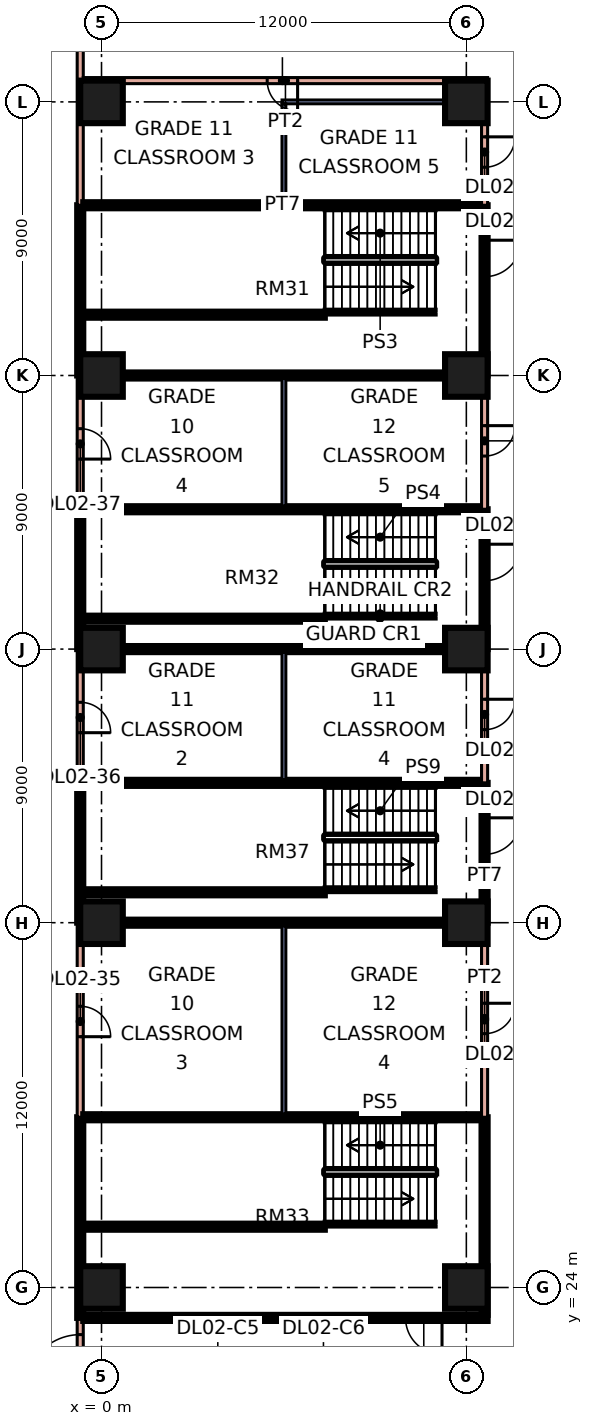
"""IFC4 building model, lengths in metres.
Left out: names, types, materials, properties, quantities, classifications, styles, units other than length and angle.
Written with IfcOpenShell. Run it as: python <this file> out.ifc"""

import sys

from ifc_helpers import new_model, si_unit, direction, frame, frame_2d, origin, origin_2d, place, context, subcontext, project, spatial, rectangle, extrude, element, fill, save


model = new_model("IFC4")
c1 = context("Model", 3, precision=1e-05, world=origin(), true_north=direction((0.0, 1.0)))
c2 = subcontext(c1, "Body", "Model", "MODEL_VIEW")
j1 = project(units=[si_unit("LENGTHUNIT", "METRE"), si_unit("PLANEANGLEUNIT", "RADIAN")], contexts=[c1])
p1 = place(None, origin())
s1 = spatial("IfcSite", under=j1, at=p1, CompositionType="ELEMENT")
p2 = place(p1, origin())
s2 = spatial("IfcBuilding", under=s1, at=p2, CompositionType="ELEMENT")
p3 = place(p2, frame((0.0, 0.0, 12.0)))
s3 = spatial("IfcBuildingStorey", under=s2, at=p3, CompositionType="ELEMENT", Elevation=12.0)
for number, where, z_axis, x_axis in (
    (1, (0.0, 24.0, 0.0), (0.0, 0.0, 1.0), (1.0, 0.0, 0.0)),
    (2, (12.0, 24.0, 0.0), (0.0, 0.0, 1.0), (1.0, 0.0, 0.0)),
    (3, (0.0, 36.0, 0.0), (0.0, 0.0, 1.0), (1.0, 0.0, 0.0)),
    (4, (12.0, 36.0, 0.0), (0.0, 0.0, 1.0), (1.0, 0.0, 0.0)),
    (5, (0.0, 45.0, 0.0), (0.0, 0.0, 1.0), (1.0, 0.0, 0.0)),
    (6, (12.0, 45.0, 0.0), (0.0, 0.0, 1.0), (1.0, 0.0, 0.0)),
    (7, (0.0, 54.0, 0.0), (0.0, 0.0, 1.0), (1.0, 0.0, 0.0)),
    (8, (12.0, 54.0, 0.0), (0.0, 0.0, 1.0), (1.0, 0.0, 0.0)),
    (9, (0.0, 63.0, 0.0), (0.0, 0.0, 1.0), (1.0, 0.0, 0.0)),
    (10, (12.0, 63.0, 0.0), (0.0, 0.0, 1.0), (1.0, 0.0, 0.0)),
):
    element("IfcColumn", number, at=place(p3, frame(where, z_axis=z_axis, x_axis=x_axis)), inside=s3, PredefinedType="COLUMN", context=c2, shape_type="SweptSolid", body=[
        extrude(rectangle(XDim=1.4, YDim=1.4, at=origin_2d()), origin(), (0.0, 0.0, 1.0), 4.8),
    ])
p4 = place(p3, frame((-0.7, 0.7, 0.0), z_axis=(0.0, 0.0, 1.0), x_axis=(0.0, 1.0, 0.0)))
e11 = element("IfcWall", 11, at=p4, inside=s3, PredefinedType="PARTITIONING", context=c2, shape_type="SweptSolid", body=[
    extrude(rectangle(XDim=22.3, YDim=0.2, at=frame_2d((11.15, 0.0))), origin(), (0.0, 0.0, 1.0), 4.4),
])
p5 = place(p4, frame((19.95, 0.0, 0.0)))
e12 = element("IfcOpeningElement", 12, at=p5, cuts=e11, PredefinedType="OPENING", context=c2, shape_type="SweptSolid", body=[
    extrude(rectangle(XDim=1.8, YDim=2.1, at=frame_2d((0.9, 1.05))), frame((0.0, 0.11, 0.0), z_axis=(0.0, -1.0, 0.0), x_axis=(1.0, 0.0, 0.0)), (0.0, 0.0, 1.0), 0.22),
])
p6 = place(p4, frame((12.2, 0.0, 0.0)))
e13 = element("IfcOpeningElement", 13, at=p6, cuts=e11, PredefinedType="OPENING", context=c2, shape_type="SweptSolid", body=[
    extrude(rectangle(XDim=1.0, YDim=2.1, at=frame_2d((0.5, 1.05))), frame((0.0, 0.11, 0.0), z_axis=(0.0, -1.0, 0.0), x_axis=(1.0, 0.0, 0.0)), (0.0, 0.0, 1.0), 0.22),
])
p7 = place(p4, frame((3.0, 0.0, 0.0)))
e14 = element("IfcOpeningElement", 14, at=p7, cuts=e11, PredefinedType="OPENING", context=c2, shape_type="SweptSolid", body=[
    extrude(rectangle(XDim=1.0, YDim=2.1, at=frame_2d((0.5, 1.05))), frame((0.0, 0.11, 0.0), z_axis=(0.0, -1.0, 0.0), x_axis=(1.0, 0.0, 0.0)), (0.0, 0.0, 1.0), 0.22),
])
p8 = place(p3, frame((-0.7, 23.0, 0.0), z_axis=(0.0, 0.0, 1.0), x_axis=(0.0, 1.0, 0.0)))
e15 = element("IfcWall", 15, at=p8, inside=s3, PredefinedType="SOLIDWALL", context=c2, shape_type="SweptSolid", body=[
    extrude(rectangle(XDim=6.6, YDim=0.2, at=frame_2d((3.3, 0.0))), origin(), (0.0, 0.0, 1.0), 4.4),
])
p9 = place(p3, frame((-0.7, 29.6, 0.0), z_axis=(0.0, 0.0, 1.0), x_axis=(0.0, 1.0, 0.0)))
e16 = element("IfcWall", 16, at=p9, inside=s3, PredefinedType="PARTITIONING", context=c2, shape_type="SweptSolid", body=[
    extrude(rectangle(XDim=6.4, YDim=0.2, at=frame_2d((3.2, 0.0))), origin(), (0.0, 0.0, 1.0), 4.4),
])
p10 = place(p9, frame((2.65, 0.0, 0.0)))
e17 = element("IfcOpeningElement", 17, at=p10, cuts=e16, PredefinedType="OPENING", context=c2, shape_type="SweptSolid", body=[
    extrude(rectangle(XDim=1.0, YDim=2.1, at=frame_2d((0.5, 1.05))), frame((0.0, 0.11, 0.0), z_axis=(0.0, -1.0, 0.0), x_axis=(1.0, 0.0, 0.0)), (0.0, 0.0, 1.0), 0.22),
])
p11 = place(p3, frame((-0.7, 36.0, 0.0), z_axis=(0.0, 0.0, 1.0), x_axis=(0.0, 1.0, 0.0)))
e18 = element("IfcWall", 18, at=p11, inside=s3, PredefinedType="SOLIDWALL", context=c2, shape_type="SweptSolid", body=[
    extrude(rectangle(XDim=4.6, YDim=0.2, at=frame_2d((2.3, 0.0))), origin(), (0.0, 0.0, 1.0), 4.4),
])
p12 = place(p3, frame((-0.7, 40.6, 0.0), z_axis=(0.0, 0.0, 1.0), x_axis=(0.0, 1.0, 0.0)))
e19 = element("IfcWall", 19, at=p12, inside=s3, PredefinedType="PARTITIONING", context=c2, shape_type="SweptSolid", body=[
    extrude(rectangle(XDim=4.4, YDim=0.2, at=frame_2d((2.2, 0.0))), origin(), (0.0, 0.0, 1.0), 4.4),
])
p13 = place(p12, frame((1.65, 0.0, 0.0)))
e20 = element("IfcOpeningElement", 20, at=p13, cuts=e19, PredefinedType="OPENING", context=c2, shape_type="SweptSolid", body=[
    extrude(rectangle(XDim=1.0, YDim=2.1, at=frame_2d((0.5, 1.05))), frame((0.0, 0.11, 0.0), z_axis=(0.0, -1.0, 0.0), x_axis=(1.0, 0.0, 0.0)), (0.0, 0.0, 1.0), 0.22),
])
p14 = place(p3, frame((-0.7, 45.0, 0.0), z_axis=(0.0, 0.0, 1.0), x_axis=(0.0, 1.0, 0.0)))
e21 = element("IfcWall", 21, at=p14, inside=s3, PredefinedType="SOLIDWALL", context=c2, shape_type="SweptSolid", body=[
    extrude(rectangle(XDim=4.6, YDim=0.2, at=frame_2d((2.3, 0.0))), origin(), (0.0, 0.0, 1.0), 4.4),
])
p15 = place(p3, frame((-0.7, 49.6, 0.0), z_axis=(0.0, 0.0, 1.0), x_axis=(0.0, 1.0, 0.0)))
e22 = element("IfcWall", 22, at=p15, inside=s3, PredefinedType="PARTITIONING", context=c2, shape_type="SweptSolid", body=[
    extrude(rectangle(XDim=4.4, YDim=0.2, at=frame_2d((2.2, 0.0))), origin(), (0.0, 0.0, 1.0), 4.4),
])
p16 = place(p15, frame((1.65, 0.0, 0.0)))
e23 = element("IfcOpeningElement", 23, at=p16, cuts=e22, PredefinedType="OPENING", context=c2, shape_type="SweptSolid", body=[
    extrude(rectangle(XDim=1.0, YDim=2.1, at=frame_2d((0.5, 1.05))), frame((0.0, 0.11, 0.0), z_axis=(0.0, -1.0, 0.0), x_axis=(1.0, 0.0, 0.0)), (0.0, 0.0, 1.0), 0.22),
])
p17 = place(p3, frame((-0.7, 54.0, 0.0), z_axis=(0.0, 0.0, 1.0), x_axis=(0.0, 1.0, 0.0)))
e24 = element("IfcWall", 24, at=p17, inside=s3, PredefinedType="SOLIDWALL", context=c2, shape_type="SweptSolid", body=[
    extrude(rectangle(XDim=5.6, YDim=0.2, at=frame_2d((2.8, 0.0))), origin(), (0.0, 0.0, 1.0), 4.4),
])
p18 = place(p3, frame((-0.7, 59.6, 0.0), z_axis=(0.0, 0.0, 1.0), x_axis=(0.0, 1.0, 0.0)))
e25 = element("IfcWall", 25, at=p18, inside=s3, PredefinedType="PARTITIONING", context=c2, shape_type="SweptSolid", body=[
    extrude(rectangle(XDim=6.4, YDim=0.2, at=frame_2d((3.2, 0.0))), origin(), (0.0, 0.0, 1.0), 4.4),
])
p19 = place(p3, frame((-0.6, 23.0, 0.0), z_axis=(0.0, 0.0, 1.0), x_axis=(1.0, 0.0, 0.0)))
e26 = element("IfcWall", 26, at=p19, inside=s3, PredefinedType="SOLIDWALL", context=c2, shape_type="SweptSolid", body=[
    extrude(rectangle(XDim=13.3, YDim=0.2, at=frame_2d((6.65, 0.0))), origin(), (0.0, 0.0, 1.0), 4.4),
])
p20 = place(p19, frame((10.6, 0.0, 0.0)))
e27 = element("IfcOpeningElement", 27, at=p20, cuts=e26, PredefinedType="OPENING", context=c2, shape_type="SweptSolid", body=[
    extrude(rectangle(XDim=1.2, YDim=2.1, at=frame_2d((0.6, 1.05))), frame((0.0, 0.11, 0.0), z_axis=(0.0, -1.0, 0.0), x_axis=(1.0, 0.0, 0.0)), (0.0, 0.0, 1.0), 0.22),
])
for number, where, z_axis, x_axis in (
    (28, (-0.6, 29.6, 0.0), (0.0, 0.0, 1.0), (1.0, 0.0, 0.0)),
    (29, (-0.6, 36.0, 0.0), (0.0, 0.0, 1.0), (1.0, 0.0, 0.0)),
    (30, (-0.6, 40.6, 0.0), (0.0, 0.0, 1.0), (1.0, 0.0, 0.0)),
    (31, (-0.6, 45.0, 0.0), (0.0, 0.0, 1.0), (1.0, 0.0, 0.0)),
    (32, (-0.6, 49.6, 0.0), (0.0, 0.0, 1.0), (1.0, 0.0, 0.0)),
    (33, (-0.6, 54.0, 0.0), (0.0, 0.0, 1.0), (1.0, 0.0, 0.0)),
    (34, (-0.6, 59.6, 0.0), (0.0, 0.0, 1.0), (1.0, 0.0, 0.0)),
):
    element("IfcWall", number, at=place(p3, frame(where, z_axis=z_axis, x_axis=x_axis)), inside=s3, PredefinedType="SOLIDWALL", context=c2, shape_type="SweptSolid", body=[
        extrude(rectangle(XDim=13.1, YDim=0.2, at=frame_2d((6.55, 0.0))), origin(), (0.0, 0.0, 1.0), 4.4),
    ])
p21 = place(p3, frame((-0.6, 63.7, 0.0), z_axis=(0.0, 0.0, 1.0), x_axis=(1.0, 0.0, 0.0)))
e35 = element("IfcWall", 35, at=p21, inside=s3, PredefinedType="PARTITIONING", context=c2, shape_type="SweptSolid", body=[
    extrude(rectangle(XDim=13.3, YDim=0.2, at=frame_2d((6.65, 0.0))), origin(), (0.0, 0.0, 1.0), 4.4),
])
p22 = place(p21, frame((6.05, 0.0, 0.0)))
e36 = element("IfcOpeningElement", 36, at=p22, cuts=e35, PredefinedType="OPENING", context=c2, shape_type="SweptSolid", body=[
    extrude(rectangle(XDim=1.0, YDim=2.1, at=frame_2d((0.5, 1.05))), frame((0.0, 0.11, 0.0), z_axis=(0.0, -1.0, 0.0), x_axis=(1.0, 0.0, 0.0)), (0.0, 0.0, 1.0), 0.22),
])
p23 = place(p3, frame((5.938, 63.0, 0.0), z_axis=(0.0, 0.0, 1.0), x_axis=(1.0, 0.0, 0.0)))
e37 = element("IfcWall", 37, at=p23, inside=s3, PredefinedType="PARTITIONING", context=c2, shape_type="SweptSolid", body=[
    extrude(rectangle(XDim=6.562, YDim=0.125, at=frame_2d((3.281, 0.0))), origin(), (0.0, 0.0, 1.0), 4.4),
])
p24 = place(p3, frame((6.0, 29.7, 0.0), z_axis=(0.0, 0.0, 1.0), x_axis=(0.0, 1.0, 0.0)))
e38 = element("IfcWall", 38, at=p24, inside=s3, PredefinedType="PARTITIONING", context=c2, shape_type="SweptSolid", body=[
    extrude(rectangle(XDim=6.2, YDim=0.125, at=frame_2d((3.1, 0.0))), origin(), (0.0, 0.0, 1.0), 4.4),
])
for number, where, z_axis, x_axis in (
    (39, (6.0, 40.7, 0.0), (0.0, 0.0, 1.0), (0.0, 1.0, 0.0)),
    (40, (6.0, 49.7, 0.0), (0.0, 0.0, 1.0), (0.0, 1.0, 0.0)),
):
    element("IfcWall", number, at=place(p3, frame(where, z_axis=z_axis, x_axis=x_axis)), inside=s3, PredefinedType="PARTITIONING", context=c2, shape_type="SweptSolid", body=[
        extrude(rectangle(XDim=4.2, YDim=0.125, at=frame_2d((2.1, 0.0))), origin(), (0.0, 0.0, 1.0), 4.4),
    ])
p25 = place(p3, frame((6.0, 59.7, 0.0), z_axis=(0.0, 0.0, 1.0), x_axis=(0.0, 1.0, 0.0)))
e41 = element("IfcWall", 41, at=p25, inside=s3, PredefinedType="PARTITIONING", context=c2, shape_type="SweptSolid", body=[
    extrude(rectangle(XDim=3.238, YDim=0.125, at=frame_2d((1.619, 0.0))), origin(), (0.0, 0.0, 1.0), 4.4),
])
p26 = place(p3, frame((12.6, 23.1, 0.0), z_axis=(0.0, 0.0, 1.0), x_axis=(0.0, 1.0, 0.0)))
e42 = element("IfcWall", 42, at=p26, inside=s3, PredefinedType="SOLIDWALL", context=c2, shape_type="SweptSolid", body=[
    extrude(rectangle(XDim=6.5, YDim=0.2, at=frame_2d((3.25, 0.0))), origin(), (0.0, 0.0, 1.0), 4.4),
])
p27 = place(p3, frame((12.6, 29.6, 0.0), z_axis=(0.0, 0.0, 1.0), x_axis=(0.0, 1.0, 0.0)))
e43 = element("IfcWall", 43, at=p27, inside=s3, PredefinedType="PARTITIONING", context=c2, shape_type="SweptSolid", body=[
    extrude(rectangle(XDim=6.4, YDim=0.2, at=frame_2d((3.2, 0.0))), origin(), (0.0, 0.0, 1.0), 4.4),
])
p28 = place(p27, frame((2.75, 0.0, 0.0)))
e44 = element("IfcOpeningElement", 44, at=p28, cuts=e43, PredefinedType="OPENING", context=c2, shape_type="SweptSolid", body=[
    extrude(rectangle(XDim=1.0, YDim=2.1, at=frame_2d((0.5, 1.05))), frame((0.0, 0.11, 0.0), z_axis=(0.0, -1.0, 0.0), x_axis=(1.0, 0.0, 0.0)), (0.0, 0.0, 1.0), 0.22),
])
p29 = place(p3, frame((12.6, 36.0, 0.0), z_axis=(0.0, 0.0, 1.0), x_axis=(0.0, 1.0, 0.0)))
e45 = element("IfcWall", 45, at=p29, inside=s3, PredefinedType="SOLIDWALL", context=c2, shape_type="SweptSolid", body=[
    extrude(rectangle(XDim=4.6, YDim=0.2, at=frame_2d((2.3, 0.0))), origin(), (0.0, 0.0, 1.0), 4.4),
])
p30 = place(p29, frame((2.25, 0.0, 0.0)))
e46 = element("IfcOpeningElement", 46, at=p30, cuts=e45, PredefinedType="OPENING", context=c2, shape_type="SweptSolid", body=[
    extrude(rectangle(XDim=1.2, YDim=2.1, at=frame_2d((0.6, 1.05))), frame((0.0, 0.11, 0.0), z_axis=(0.0, -1.0, 0.0), x_axis=(1.0, 0.0, 0.0)), (0.0, 0.0, 1.0), 0.22),
])
p31 = place(p3, frame((12.6, 40.6, 0.0), z_axis=(0.0, 0.0, 1.0), x_axis=(0.0, 1.0, 0.0)))
e47 = element("IfcWall", 47, at=p31, inside=s3, PredefinedType="PARTITIONING", context=c2, shape_type="SweptSolid", body=[
    extrude(rectangle(XDim=4.4, YDim=0.2, at=frame_2d((2.2, 0.0))), origin(), (0.0, 0.0, 1.0), 4.4),
])
p32 = place(p31, frame((1.75, 0.0, 0.0)))
e48 = element("IfcOpeningElement", 48, at=p32, cuts=e47, PredefinedType="OPENING", context=c2, shape_type="SweptSolid", body=[
    extrude(rectangle(XDim=1.0, YDim=2.1, at=frame_2d((0.5, 1.05))), frame((0.0, 0.11, 0.0), z_axis=(0.0, -1.0, 0.0), x_axis=(1.0, 0.0, 0.0)), (0.0, 0.0, 1.0), 0.22),
])
p33 = place(p3, frame((12.6, 45.0, 0.0), z_axis=(0.0, 0.0, 1.0), x_axis=(0.0, 1.0, 0.0)))
e49 = element("IfcWall", 49, at=p33, inside=s3, PredefinedType="SOLIDWALL", context=c2, shape_type="SweptSolid", body=[
    extrude(rectangle(XDim=4.6, YDim=0.2, at=frame_2d((2.3, 0.0))), origin(), (0.0, 0.0, 1.0), 4.4),
])
p34 = place(p33, frame((2.25, 0.0, 0.0)))
e50 = element("IfcOpeningElement", 50, at=p34, cuts=e49, PredefinedType="OPENING", context=c2, shape_type="SweptSolid", body=[
    extrude(rectangle(XDim=1.2, YDim=2.1, at=frame_2d((0.6, 1.05))), frame((0.0, 0.11, 0.0), z_axis=(0.0, -1.0, 0.0), x_axis=(1.0, 0.0, 0.0)), (0.0, 0.0, 1.0), 0.22),
])
p35 = place(p3, frame((12.6, 49.6, 0.0), z_axis=(0.0, 0.0, 1.0), x_axis=(0.0, 1.0, 0.0)))
e51 = element("IfcWall", 51, at=p35, inside=s3, PredefinedType="PARTITIONING", context=c2, shape_type="SweptSolid", body=[
    extrude(rectangle(XDim=4.4, YDim=0.2, at=frame_2d((2.2, 0.0))), origin(), (0.0, 0.0, 1.0), 4.4),
])
p36 = place(p35, frame((1.75, 0.0, 0.0)))
e52 = element("IfcOpeningElement", 52, at=p36, cuts=e51, PredefinedType="OPENING", context=c2, shape_type="SweptSolid", body=[
    extrude(rectangle(XDim=1.0, YDim=2.1, at=frame_2d((0.5, 1.05))), frame((0.0, 0.11, 0.0), z_axis=(0.0, -1.0, 0.0), x_axis=(1.0, 0.0, 0.0)), (0.0, 0.0, 1.0), 0.22),
])
p37 = place(p3, frame((12.6, 54.0, 0.0), z_axis=(0.0, 0.0, 1.0), x_axis=(0.0, 1.0, 0.0)))
e53 = element("IfcWall", 53, at=p37, inside=s3, PredefinedType="SOLIDWALL", context=c2, shape_type="SweptSolid", body=[
    extrude(rectangle(XDim=5.6, YDim=0.2, at=frame_2d((2.8, 0.0))), origin(), (0.0, 0.0, 1.0), 4.4),
])
p38 = place(p37, frame((3.25, 0.0, 0.0)))
e54 = element("IfcOpeningElement", 54, at=p38, cuts=e53, PredefinedType="OPENING", context=c2, shape_type="SweptSolid", body=[
    extrude(rectangle(XDim=1.2, YDim=2.1, at=frame_2d((0.6, 1.05))), frame((0.0, 0.11, 0.0), z_axis=(0.0, -1.0, 0.0), x_axis=(1.0, 0.0, 0.0)), (0.0, 0.0, 1.0), 0.22),
])
p39 = place(p3, frame((12.6, 59.6, 0.0), z_axis=(0.0, 0.0, 1.0), x_axis=(0.0, 1.0, 0.0)))
e55 = element("IfcWall", 55, at=p39, inside=s3, PredefinedType="PARTITIONING", context=c2, shape_type="SweptSolid", body=[
    extrude(rectangle(XDim=4.0, YDim=0.2, at=frame_2d((2.0, 0.0))), origin(), (0.0, 0.0, 1.0), 4.4),
])
p40 = place(p39, frame((1.25, 0.0, 0.0)))
e56 = element("IfcOpeningElement", 56, at=p40, cuts=e55, PredefinedType="OPENING", context=c2, shape_type="SweptSolid", body=[
    extrude(rectangle(XDim=1.0, YDim=2.1, at=frame_2d((0.5, 1.05))), frame((0.0, 0.11, 0.0), z_axis=(0.0, -1.0, 0.0), x_axis=(1.0, 0.0, 0.0)), (0.0, 0.0, 1.0), 0.22),
])
for number, where, z_axis, x_axis in (
    (57, (-0.6, 56.0, 0.0), (0.0, 0.0, 1.0), (1.0, 0.0, 0.0)),
    (58, (-0.6, 46.0, 0.0), (0.0, 0.0, 1.0), (1.0, 0.0, 0.0)),
    (59, (-0.6, 26.0, 0.0), (0.0, 0.0, 1.0), (1.0, 0.0, 0.0)),
    (60, (-0.6, 37.0, 0.0), (0.0, 0.0, 1.0), (1.0, 0.0, 0.0)),
):
    element("IfcWall", number, at=place(p3, frame(where, z_axis=z_axis, x_axis=x_axis)), inside=s3, PredefinedType="SOLIDWALL", context=c2, shape_type="SweptSolid", body=[
        extrude(rectangle(XDim=7.945, YDim=0.2, at=frame_2d((3.973, 0.0))), origin(), (0.0, 0.0, 1.0), 4.4),
    ])
p41 = place(p28, origin())
e61 = element("IfcDoor", 61, at=p41, inside=s3, OperationType="SINGLE_SWING_RIGHT", PredefinedType="DOOR", context=c2, shape_type="SweptSolid", body=[
    extrude(rectangle(XDim=1.0, YDim=2.1, at=frame_2d((0.5, 1.05))), frame((0.0, 0.025, 0.0), z_axis=(0.0, -1.0, 0.0), x_axis=(1.0, 0.0, 0.0)), (0.0, 0.0, 1.0), 0.05),
])
fill(e44, e61)
p42 = place(p32, origin())
e62 = element("IfcDoor", 62, at=p42, inside=s3, OperationType="SINGLE_SWING_RIGHT", PredefinedType="DOOR", context=c2, shape_type="SweptSolid", body=[
    extrude(rectangle(XDim=1.0, YDim=2.1, at=frame_2d((0.5, 1.05))), frame((0.0, 0.025, 0.0), z_axis=(0.0, -1.0, 0.0), x_axis=(1.0, 0.0, 0.0)), (0.0, 0.0, 1.0), 0.05),
])
fill(e48, e62)
p43 = place(p36, origin())
e63 = element("IfcDoor", 63, at=p43, inside=s3, OperationType="SINGLE_SWING_RIGHT", PredefinedType="DOOR", context=c2, shape_type="SweptSolid", body=[
    extrude(rectangle(XDim=1.0, YDim=2.1, at=frame_2d((0.5, 1.05))), frame((0.0, 0.025, 0.0), z_axis=(0.0, -1.0, 0.0), x_axis=(1.0, 0.0, 0.0)), (0.0, 0.0, 1.0), 0.05),
])
fill(e52, e63)
p44 = place(p40, origin())
e64 = element("IfcDoor", 64, at=p44, inside=s3, OperationType="SINGLE_SWING_RIGHT", PredefinedType="DOOR", context=c2, shape_type="SweptSolid", body=[
    extrude(rectangle(XDim=1.0, YDim=2.1, at=frame_2d((0.5, 1.05))), frame((0.0, 0.025, 0.0), z_axis=(0.0, -1.0, 0.0), x_axis=(1.0, 0.0, 0.0)), (0.0, 0.0, 1.0), 0.05),
])
fill(e56, e64)
p45 = place(p10, frame((1.0, 0.0, 0.0), z_axis=(0.0, 0.0, 1.0), x_axis=(-1.0, 0.0, 0.0)))
e65 = element("IfcDoor", 65, at=p45, inside=s3, OperationType="SINGLE_SWING_LEFT", PredefinedType="DOOR", context=c2, shape_type="SweptSolid", body=[
    extrude(rectangle(XDim=1.0, YDim=2.1, at=frame_2d((0.5, 1.05))), frame((0.0, 0.025, 0.0), z_axis=(0.0, -1.0, 0.0), x_axis=(1.0, 0.0, 0.0)), (0.0, 0.0, 1.0), 0.05),
])
fill(e17, e65)
p46 = place(p13, frame((1.0, 0.0, 0.0), z_axis=(0.0, 0.0, 1.0), x_axis=(-1.0, 0.0, 0.0)))
e66 = element("IfcDoor", 66, at=p46, inside=s3, OperationType="SINGLE_SWING_LEFT", PredefinedType="DOOR", context=c2, shape_type="SweptSolid", body=[
    extrude(rectangle(XDim=1.0, YDim=2.1, at=frame_2d((0.5, 1.05))), frame((0.0, 0.025, 0.0), z_axis=(0.0, -1.0, 0.0), x_axis=(1.0, 0.0, 0.0)), (0.0, 0.0, 1.0), 0.05),
])
fill(e20, e66)
p47 = place(p16, frame((1.0, 0.0, 0.0), z_axis=(0.0, 0.0, 1.0), x_axis=(-1.0, 0.0, 0.0)))
e67 = element("IfcDoor", 67, at=p47, inside=s3, OperationType="SINGLE_SWING_LEFT", PredefinedType="DOOR", context=c2, shape_type="SweptSolid", body=[
    extrude(rectangle(XDim=1.0, YDim=2.1, at=frame_2d((0.5, 1.05))), frame((0.0, 0.025, 0.0), z_axis=(0.0, -1.0, 0.0), x_axis=(1.0, 0.0, 0.0)), (0.0, 0.0, 1.0), 0.05),
])
fill(e23, e67)
p48 = place(p22, origin())
e68 = element("IfcDoor", 68, at=p48, inside=s3, OperationType="SINGLE_SWING_RIGHT", PredefinedType="DOOR", context=c2, shape_type="SweptSolid", body=[
    extrude(rectangle(XDim=1.0, YDim=2.1, at=frame_2d((0.5, 1.05))), frame((0.0, 0.025, 0.0), z_axis=(0.0, -1.0, 0.0), x_axis=(1.0, 0.0, 0.0)), (0.0, 0.0, 1.0), 0.05),
])
fill(e36, e68)
p49 = place(p5, origin())
e69 = element("IfcDoor", 69, at=p49, inside=s3, OperationType="DOUBLE_DOOR_SINGLE_SWING", PredefinedType="DOOR", context=c2, shape_type="SweptSolid", body=[
    extrude(rectangle(XDim=1.8, YDim=2.1, at=frame_2d((0.9, 1.05))), frame((0.0, 0.025, 0.0), z_axis=(0.0, -1.0, 0.0), x_axis=(1.0, 0.0, 0.0)), (0.0, 0.0, 1.0), 0.05),
])
fill(e12, e69)
p50 = place(p38, origin())
e70 = element("IfcDoor", 70, at=p50, inside=s3, OperationType="SINGLE_SWING_RIGHT", PredefinedType="DOOR", context=c2, shape_type="SweptSolid", body=[
    extrude(rectangle(XDim=1.2, YDim=2.1, at=frame_2d((0.6, 1.05))), frame((0.0, 0.025, 0.0), z_axis=(0.0, -1.0, 0.0), x_axis=(1.0, 0.0, 0.0)), (0.0, 0.0, 1.0), 0.05),
])
fill(e54, e70)
p51 = place(p34, origin())
e71 = element("IfcDoor", 71, at=p51, inside=s3, OperationType="SINGLE_SWING_RIGHT", PredefinedType="DOOR", context=c2, shape_type="SweptSolid", body=[
    extrude(rectangle(XDim=1.2, YDim=2.1, at=frame_2d((0.6, 1.05))), frame((0.0, 0.025, 0.0), z_axis=(0.0, -1.0, 0.0), x_axis=(1.0, 0.0, 0.0)), (0.0, 0.0, 1.0), 0.05),
])
fill(e50, e71)
p52 = place(p20, origin())
e72 = element("IfcDoor", 72, at=p52, inside=s3, OperationType="SINGLE_SWING_RIGHT", PredefinedType="DOOR", context=c2, shape_type="SweptSolid", body=[
    extrude(rectangle(XDim=1.2, YDim=2.1, at=frame_2d((0.6, 1.05))), frame((0.0, 0.025, 0.0), z_axis=(0.0, -1.0, 0.0), x_axis=(1.0, 0.0, 0.0)), (0.0, 0.0, 1.0), 0.05),
])
fill(e27, e72)
p53 = place(p30, origin())
e73 = element("IfcDoor", 73, at=p53, inside=s3, OperationType="SINGLE_SWING_RIGHT", PredefinedType="DOOR", context=c2, shape_type="SweptSolid", body=[
    extrude(rectangle(XDim=1.2, YDim=2.1, at=frame_2d((0.6, 1.05))), frame((0.0, 0.025, 0.0), z_axis=(0.0, -1.0, 0.0), x_axis=(1.0, 0.0, 0.0)), (0.0, 0.0, 1.0), 0.05),
])
fill(e46, e73)
save(model, sys.argv[1])
